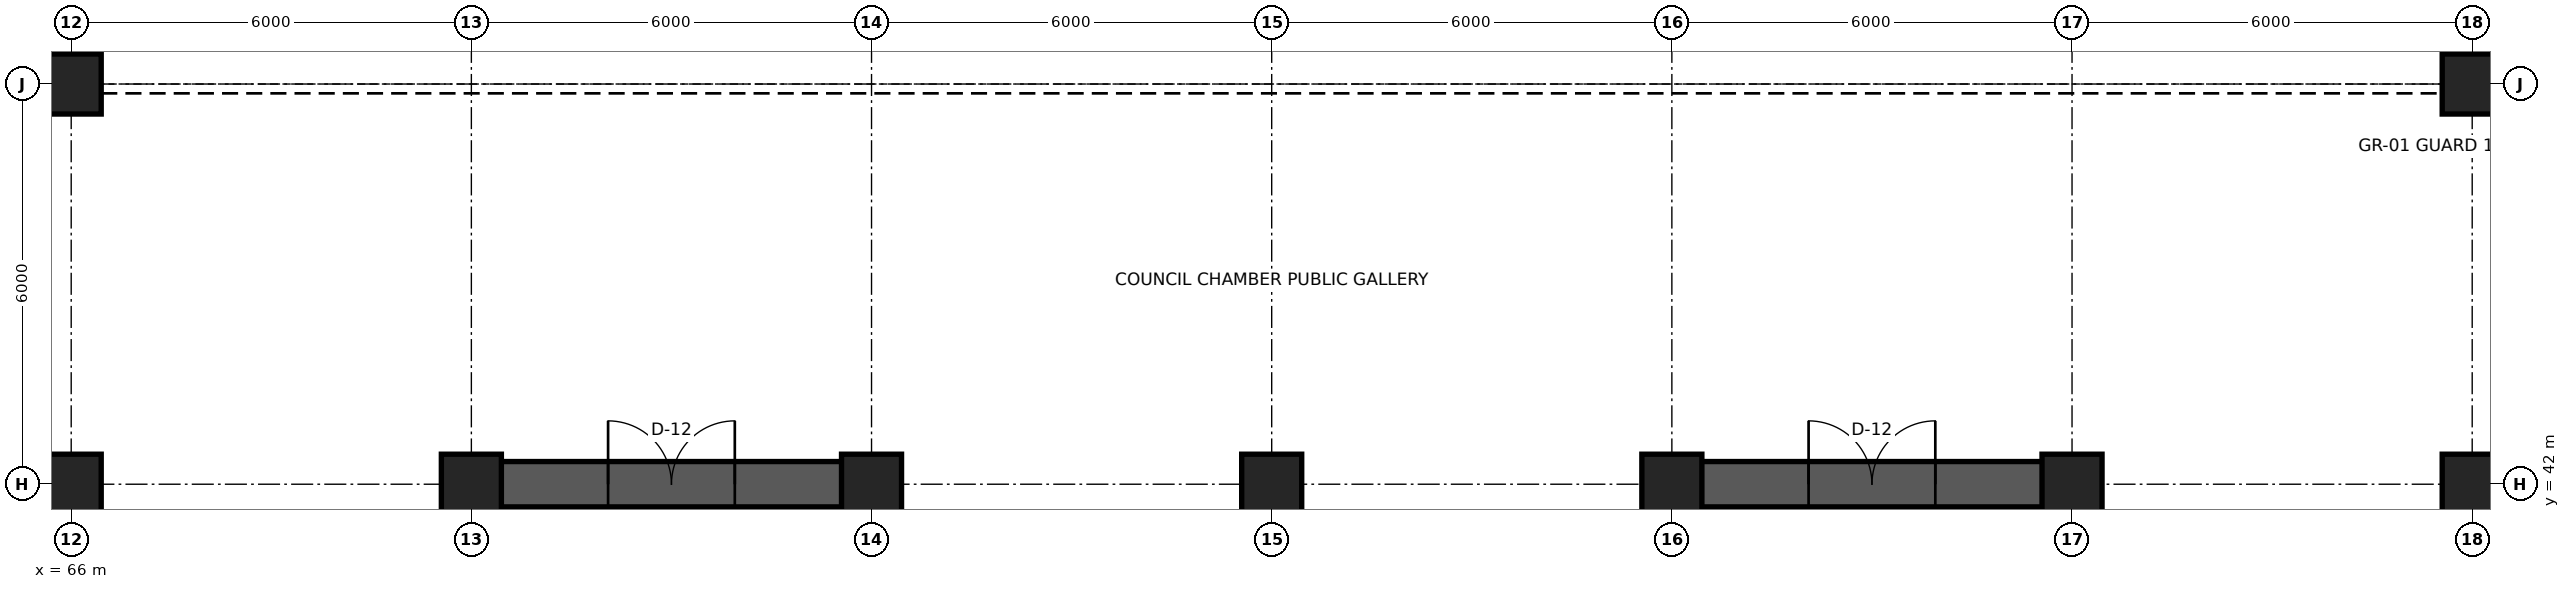
"""IFC4 building model, lengths in metres.
Left out: names, types, materials, properties, quantities, classifications, styles, units other than length and angle.
Written with IfcOpenShell. Run it as: python <this file> out.ifc"""

import sys

from ifc_helpers import new_model, si_unit, direction, frame, frame_2d, origin, origin_2d, place, context, subcontext, project, spatial, rectangle, extrude, element, fill, save


model = new_model("IFC4")
c1 = context("Model", 3, precision=1e-05, world=origin(), true_north=direction((0.0, 1.0)))
c2 = subcontext(c1, "Body", "Model", "MODEL_VIEW")
j1 = project(units=[si_unit("LENGTHUNIT", "METRE"), si_unit("PLANEANGLEUNIT", "RADIAN")], contexts=[c1])
p1 = place(None, origin())
s1 = spatial("IfcSite", under=j1, at=p1, CompositionType="ELEMENT")
p2 = place(p1, origin())
s2 = spatial("IfcBuilding", under=s1, at=p2, CompositionType="ELEMENT")
p3 = place(p2, frame((0.0, 0.0, 12.0)))
s3 = spatial("IfcBuildingStorey", under=s2, at=p3, CompositionType="ELEMENT", Elevation=12.0)
for number, where, z_axis, x_axis in (
    (1, (66.0, 42.0, 0.0), (0.0, 0.0, 1.0), (1.0, 0.0, 0.0)),
    (2, (72.0, 42.0, 0.0), (0.0, 0.0, 1.0), (1.0, 0.0, 0.0)),
    (3, (78.0, 42.0, 0.0), (0.0, 0.0, 1.0), (1.0, 0.0, 0.0)),
    (4, (84.0, 42.0, 0.0), (0.0, 0.0, 1.0), (1.0, 0.0, 0.0)),
    (5, (90.0, 42.0, 0.0), (0.0, 0.0, 1.0), (1.0, 0.0, 0.0)),
    (6, (96.0, 42.0, 0.0), (0.0, 0.0, 1.0), (1.0, 0.0, 0.0)),
    (7, (102.0, 42.0, 0.0), (0.0, 0.0, 1.0), (1.0, 0.0, 0.0)),
    (8, (66.0, 48.0, 0.0), (0.0, 0.0, 1.0), (1.0, 0.0, 0.0)),
    (9, (102.0, 48.0, 0.0), (0.0, 0.0, 1.0), (1.0, 0.0, 0.0)),
):
    element("IfcColumn", number, at=place(p3, frame(where, z_axis=z_axis, x_axis=x_axis)), inside=s3, PredefinedType="COLUMN", context=c2, shape_type="SweptSolid", body=[
        extrude(rectangle(XDim=0.9, YDim=0.9, at=origin_2d()), origin(), (0.0, 0.0, 1.0), 4.5),
    ])
p4 = place(p3, frame((72.0, 42.0, 0.0), z_axis=(0.0, 0.0, 1.0), x_axis=(1.0, 0.0, 0.0)))
e10 = element("IfcWall", 10, at=p4, inside=s3, PredefinedType="SOLIDWALL", context=c2, shape_type="SweptSolid", body=[
    extrude(rectangle(XDim=6.0, YDim=0.68, at=frame_2d((3.0, 0.0))), origin(), (0.0, 0.0, 1.0), 4.22),
])
p5 = place(p4, frame((2.05, 0.0, 0.0)))
e11 = element("IfcOpeningElement", 11, at=p5, cuts=e10, PredefinedType="OPENING", context=c2, shape_type="SweptSolid", body=[
    extrude(rectangle(XDim=1.9, YDim=2.6, at=frame_2d((0.95, 1.3))), frame((0.0, 0.355, 0.0), z_axis=(0.0, -1.0, 0.0), x_axis=(1.0, 0.0, 0.0)), (0.0, 0.0, 1.0), 0.71),
])
p6 = place(p3, frame((90.0, 42.0, 0.0), z_axis=(0.0, 0.0, 1.0), x_axis=(1.0, 0.0, 0.0)))
e12 = element("IfcWall", 12, at=p6, inside=s3, PredefinedType="SOLIDWALL", context=c2, shape_type="SweptSolid", body=[
    extrude(rectangle(XDim=6.0, YDim=0.68, at=frame_2d((3.0, 0.0))), origin(), (0.0, 0.0, 1.0), 4.22),
])
p7 = place(p6, frame((2.05, 0.0, 0.0)))
e13 = element("IfcOpeningElement", 13, at=p7, cuts=e12, PredefinedType="OPENING", context=c2, shape_type="SweptSolid", body=[
    extrude(rectangle(XDim=1.9, YDim=2.6, at=frame_2d((0.95, 1.3))), frame((0.0, 0.355, 0.0), z_axis=(0.0, -1.0, 0.0), x_axis=(1.0, 0.0, 0.0)), (0.0, 0.0, 1.0), 0.71),
])
p8 = place(p5, origin())
e14 = element("IfcDoor", 14, at=p8, inside=s3, OperationType="DOUBLE_DOOR_SINGLE_SWING", PredefinedType="DOOR", context=c2, shape_type="SweptSolid", body=[
    extrude(rectangle(XDim=1.9, YDim=2.6, at=frame_2d((0.95, 1.3))), frame((0.0, 0.025, 0.0), z_axis=(0.0, -1.0, 0.0), x_axis=(1.0, 0.0, 0.0)), (0.0, 0.0, 1.0), 0.05),
])
fill(e11, e14)
p9 = place(p7, origin())
e15 = element("IfcDoor", 15, at=p9, inside=s3, OperationType="DOUBLE_DOOR_SINGLE_SWING", PredefinedType="DOOR", context=c2, shape_type="SweptSolid", body=[
    extrude(rectangle(XDim=1.9, YDim=2.6, at=frame_2d((0.95, 1.3))), frame((0.0, 0.025, 0.0), z_axis=(0.0, -1.0, 0.0), x_axis=(1.0, 0.0, 0.0)), (0.0, 0.0, 1.0), 0.05),
])
fill(e13, e15)
save(model, sys.argv[1])
